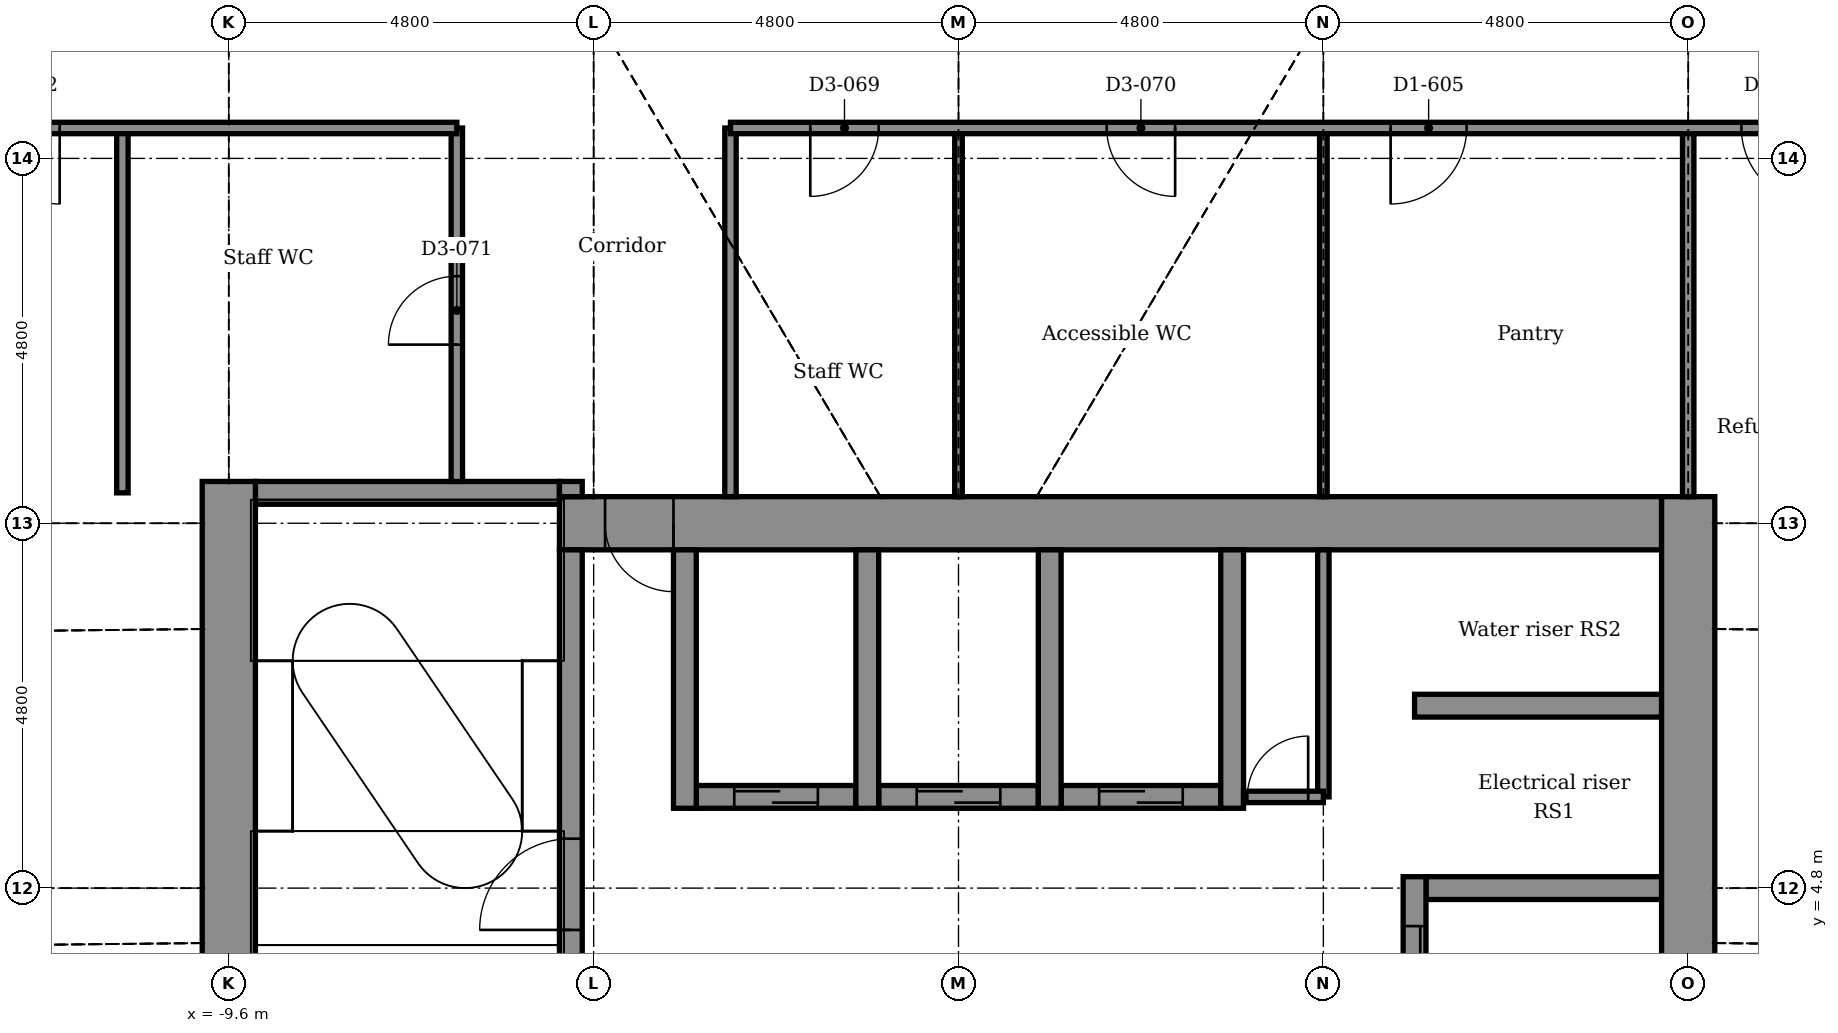
"""IFC4 building model, lengths in metres.
Left out: names, types, materials, properties, quantities, classifications, styles, units other than length and angle.
Written with IfcOpenShell. Run it as: python <this file> out.ifc"""

import sys

from ifc_helpers import new_model, si_unit, direction, frame, frame_2d, origin, place, context, subcontext, project, spatial, rectangle, extrude, element, fill, save


model = new_model("IFC4")
c1 = context("Model", 3, precision=1e-05, world=origin(), true_north=direction((0.0, 1.0)))
c2 = subcontext(c1, "Body", "Model", "MODEL_VIEW")
j1 = project(units=[si_unit("LENGTHUNIT", "METRE"), si_unit("PLANEANGLEUNIT", "RADIAN")], contexts=[c1])
p1 = place(None, origin())
s1 = spatial("IfcSite", under=j1, at=p1, CompositionType="ELEMENT")
p2 = place(p1, origin())
s2 = spatial("IfcBuilding", under=s1, at=p2, CompositionType="ELEMENT")
p3 = place(p2, frame((0.0, 0.0, 216.8)))
s3 = spatial("IfcBuildingStorey", under=s2, at=p3, CompositionType="ELEMENT", Elevation=216.8)
p4 = place(p3, frame((6.15, 4.8, -0.3), z_axis=(0.0, 0.0, 1.0), x_axis=(1.0, 0.0, 0.0)))
e1 = element("IfcWall", 1, at=p4, inside=s3, PredefinedType="STANDARD", context=c2, shape_type="SweptSolid", body=[
    extrude(rectangle(XDim=3.1, YDim=0.3, at=frame_2d((1.55, 0.0))), origin(), (0.0, 0.0, 1.0), 6.15),
])
p5 = place(p3, frame((-3.45, 6.0, -0.3), z_axis=(0.0, 0.0, 1.0), x_axis=(1.0, 0.0, 0.0)))
e2 = element("IfcWall", 2, at=p5, inside=s3, PredefinedType="STANDARD", context=c2, shape_type="SweptSolid", body=[
    extrude(rectangle(XDim=2.1, YDim=0.3, at=frame_2d((1.05, 0.0))), origin(), (0.0, 0.0, 1.0), 6.15),
])
p6 = place(p5, frame((0.5, 0.0, 0.3)))
e3 = element("IfcOpeningElement", 3, at=p6, cuts=e2, PredefinedType="OPENING", context=c2, shape_type="SweptSolid", body=[
    extrude(rectangle(XDim=1.1, YDim=2.1, at=frame_2d((0.55, 1.05))), frame((0.0, 0.16, 0.0), z_axis=(0.0, -1.0, 0.0), x_axis=(1.0, 0.0, 0.0)), (0.0, 0.0, 1.0), 0.32),
])
p7 = place(p3, frame((-1.05, 6.0, -0.3), z_axis=(0.0, 0.0, 1.0), x_axis=(1.0, 0.0, 0.0)))
e4 = element("IfcWall", 4, at=p7, inside=s3, PredefinedType="STANDARD", context=c2, shape_type="SweptSolid", body=[
    extrude(rectangle(XDim=2.1, YDim=0.3, at=frame_2d((1.05, 0.0))), origin(), (0.0, 0.0, 1.0), 6.15),
])
p8 = place(p7, frame((0.5, 0.0, 0.3)))
e5 = element("IfcOpeningElement", 5, at=p8, cuts=e4, PredefinedType="OPENING", context=c2, shape_type="SweptSolid", body=[
    extrude(rectangle(XDim=1.1, YDim=2.1, at=frame_2d((0.55, 1.05))), frame((0.0, 0.16, 0.0), z_axis=(0.0, -1.0, 0.0), x_axis=(1.0, 0.0, 0.0)), (0.0, 0.0, 1.0), 0.32),
])
p9 = place(p3, frame((1.35, 6.0, -0.3), z_axis=(0.0, 0.0, 1.0), x_axis=(1.0, 0.0, 0.0)))
e6 = element("IfcWall", 6, at=p9, inside=s3, PredefinedType="STANDARD", context=c2, shape_type="SweptSolid", body=[
    extrude(rectangle(XDim=2.1, YDim=0.3, at=frame_2d((1.05, 0.0))), origin(), (0.0, 0.0, 1.0), 6.15),
])
p10 = place(p9, frame((0.5, 0.0, 0.3)))
e7 = element("IfcOpeningElement", 7, at=p10, cuts=e6, PredefinedType="OPENING", context=c2, shape_type="SweptSolid", body=[
    extrude(rectangle(XDim=1.1, YDim=2.1, at=frame_2d((0.55, 1.05))), frame((0.0, 0.16, 0.0), z_axis=(0.0, -1.0, 0.0), x_axis=(1.0, 0.0, 0.0)), (0.0, 0.0, 1.0), 0.32),
])
p11 = place(p3, frame((6.0, 7.2, -0.3), z_axis=(0.0, 0.0, 1.0), x_axis=(1.0, 0.0, 0.0)))
e8 = element("IfcWall", 8, at=p11, inside=s3, PredefinedType="STANDARD", context=c2, shape_type="SweptSolid", body=[
    extrude(rectangle(XDim=3.25, YDim=0.3, at=frame_2d((1.625, 0.0))), origin(), (0.0, 0.0, 1.0), 6.15),
])
p12 = place(p3, frame((-5.25, 9.6, -0.3), z_axis=(0.0, 0.0, 1.0), x_axis=(1.0, 0.0, 0.0)))
e9 = element("IfcWall", 9, at=p12, inside=s3, PredefinedType="SHEAR", context=c2, shape_type="SweptSolid", body=[
    extrude(rectangle(XDim=14.5, YDim=0.7, at=frame_2d((7.25, 0.0))), origin(), (0.0, 0.0, 1.0), 6.15),
])
p13 = place(p12, frame((0.6, 0.0, 0.3)))
e10 = element("IfcOpeningElement", 10, at=p13, cuts=e9, PredefinedType="OPENING", context=c2, shape_type="SweptSolid", body=[
    extrude(rectangle(XDim=0.9, YDim=2.1, at=frame_2d((0.45, 1.05))), frame((0.0, 0.36, 0.0), z_axis=(0.0, -1.0, 0.0), x_axis=(1.0, 0.0, 0.0)), (0.0, 0.0, 1.0), 0.72),
])
p14 = place(p3, frame((-9.25, 10.0, -0.3), z_axis=(0.0, 0.0, 1.0), x_axis=(1.0, 0.0, 0.0)))
e11 = element("IfcWall", 11, at=p14, inside=s3, PredefinedType="STANDARD", context=c2, shape_type="SweptSolid", body=[
    extrude(rectangle(XDim=4.0, YDim=0.3, at=frame_2d((2.0, 0.0))), origin(), (0.0, 0.0, 1.0), 6.15),
])
p15 = place(p3, frame((-9.6, 2.55, -0.3), z_axis=(0.0, 0.0, 1.0), x_axis=(0.0, 1.0, 0.0)))
e12 = element("IfcWall", 12, at=p15, inside=s3, PredefinedType="SHEAR", context=c2, shape_type="SweptSolid", body=[
    extrude(rectangle(XDim=7.6, YDim=0.7, at=frame_2d((3.8, 0.0))), origin(), (0.0, 0.0, 1.0), 6.15),
])
p16 = place(p3, frame((-5.1, 2.25, -0.3), z_axis=(0.0, 0.0, 1.0), x_axis=(0.0, 1.0, 0.0)))
e13 = element("IfcWall", 13, at=p16, inside=s3, PredefinedType="STANDARD", context=c2, shape_type="SweptSolid", body=[
    extrude(rectangle(XDim=7.0, YDim=0.3, at=frame_2d((3.5, 0.0))), origin(), (0.0, 0.0, 1.0), 6.15),
])
p17 = place(p16, frame((2.0, 0.0, 0.3)))
e14 = element("IfcOpeningElement", 14, at=p17, cuts=e13, PredefinedType="OPENING", context=c2, shape_type="SweptSolid", body=[
    extrude(rectangle(XDim=1.2, YDim=2.1, at=frame_2d((0.6, 1.05))), frame((0.0, 0.16, 0.0), z_axis=(0.0, -1.0, 0.0), x_axis=(1.0, 0.0, 0.0)), (0.0, 0.0, 1.0), 0.32),
])
p18 = place(p3, frame((-5.1, 9.95, -0.3), z_axis=(0.0, 0.0, 1.0), x_axis=(0.0, 1.0, 0.0)))
e15 = element("IfcWall", 15, at=p18, inside=s3, PredefinedType="STANDARD", context=c2, shape_type="SweptSolid", body=[
    extrude(rectangle(XDim=0.2, YDim=0.3, at=frame_2d((0.1, 0.0))), origin(), (0.0, 0.0, 1.0), 6.15),
])
for number, where, z_axis, x_axis in (
    (16, (-3.6, 5.85, -0.3), (0.0, 0.0, 1.0), (0.0, 1.0, 0.0)),
    (17, (-1.2, 5.85, -0.3), (0.0, 0.0, 1.0), (0.0, 1.0, 0.0)),
    (18, (1.2, 5.85, -0.3), (0.0, 0.0, 1.0), (0.0, 1.0, 0.0)),
    (19, (3.6, 5.85, -0.3), (0.0, 0.0, 1.0), (0.0, 1.0, 0.0)),
):
    element("IfcWall", number, at=place(p3, frame(where, z_axis=z_axis, x_axis=x_axis)), inside=s3, PredefinedType="STANDARD", context=c2, shape_type="SweptSolid", body=[
        extrude(rectangle(XDim=3.4, YDim=0.3, at=frame_2d((1.7, 0.0))), origin(), (0.0, 0.0, 1.0), 6.15),
    ])
p19 = place(p3, frame((6.0, -2.55, -0.3), z_axis=(0.0, 0.0, 1.0), x_axis=(0.0, 1.0, 0.0)))
e20 = element("IfcWall", 20, at=p19, inside=s3, PredefinedType="STANDARD", context=c2, shape_type="SweptSolid", body=[
    extrude(rectangle(XDim=7.5, YDim=0.3, at=frame_2d((3.75, 0.0))), origin(), (0.0, 0.0, 1.0), 6.15),
])
p20 = place(p19, frame((0.65, 0.0, 0.3)))
e21 = element("IfcOpeningElement", 21, at=p20, cuts=e20, PredefinedType="OPENING", context=c2, shape_type="SweptSolid", body=[
    extrude(rectangle(XDim=1.4, YDim=2.1, at=frame_2d((0.7, 1.05))), frame((0.0, 0.16, 0.0), z_axis=(0.0, -1.0, 0.0), x_axis=(1.0, 0.0, 0.0)), (0.0, 0.0, 1.0), 0.32),
])
p21 = place(p19, frame((3.05, 0.0, 0.3)))
e22 = element("IfcOpeningElement", 22, at=p21, cuts=e20, PredefinedType="OPENING", context=c2, shape_type="SweptSolid", body=[
    extrude(rectangle(XDim=1.4, YDim=2.1, at=frame_2d((0.7, 1.05))), frame((0.0, 0.16, 0.0), z_axis=(0.0, -1.0, 0.0), x_axis=(1.0, 0.0, 0.0)), (0.0, 0.0, 1.0), 0.32),
])
p22 = place(p19, frame((5.45, 0.0, 0.3)))
e23 = element("IfcOpeningElement", 23, at=p22, cuts=e20, PredefinedType="OPENING", context=c2, shape_type="SweptSolid", body=[
    extrude(rectangle(XDim=1.4, YDim=2.1, at=frame_2d((0.7, 1.05))), frame((0.0, 0.16, 0.0), z_axis=(0.0, -1.0, 0.0), x_axis=(1.0, 0.0, 0.0)), (0.0, 0.0, 1.0), 0.32),
])
p23 = place(p3, frame((9.6, -10.15, -0.3), z_axis=(0.0, 0.0, 1.0), x_axis=(0.0, 1.0, 0.0)))
e24 = element("IfcWall", 24, at=p23, inside=s3, PredefinedType="SHEAR", context=c2, shape_type="SweptSolid", body=[
    extrude(rectangle(XDim=20.1, YDim=0.7, at=frame_2d((10.05, 0.0))), origin(), (0.0, 0.0, 1.0), 6.15),
])
p24 = place(p3, frame((9.6, 9.95, 0.0), z_axis=(0.0, 0.0, 1.0), x_axis=(0.0, 1.0, 0.0)))
e25 = element("IfcWall", 25, at=p24, inside=s3, PredefinedType="PARTITIONING", context=c2, shape_type="SweptSolid", body=[
    extrude(rectangle(XDim=4.85, YDim=0.15, at=frame_2d((2.425, 0.0))), origin(), (0.0, 0.0, 1.0), 5.393),
])
p25 = place(p3, frame((4.8, 9.95, 0.0), z_axis=(0.0, 0.0, 1.0), x_axis=(0.0, 1.0, 0.0)))
e26 = element("IfcWall", 26, at=p25, inside=s3, PredefinedType="PARTITIONING", context=c2, shape_type="SweptSolid", body=[
    extrude(rectangle(XDim=4.85, YDim=0.1, at=frame_2d((2.425, 0.0))), origin(), (0.0, 0.0, 1.0), 5.54),
])
p26 = place(p3, frame((4.8, 6.0, 0.0), z_axis=(0.0, 0.0, 1.0), x_axis=(0.0, 1.0, 0.0)))
e27 = element("IfcWall", 27, at=p26, inside=s3, PredefinedType="PARTITIONING", context=c2, shape_type="SweptSolid", body=[
    extrude(rectangle(XDim=3.25, YDim=0.15, at=frame_2d((1.625, 0.0))), origin(), (0.0, 0.0, 1.0), 5.85),
])
p27 = place(p3, frame((0.0, 9.95, 0.0), z_axis=(0.0, 0.0, 1.0), x_axis=(0.0, 1.0, 0.0)))
e28 = element("IfcWall", 28, at=p27, inside=s3, PredefinedType="PARTITIONING", context=c2, shape_type="SweptSolid", body=[
    extrude(rectangle(XDim=4.85, YDim=0.1, at=frame_2d((2.425, 0.0))), origin(), (0.0, 0.0, 1.0), 5.317),
])
p28 = place(p3, frame((-3.0, 9.95, 0.0), z_axis=(0.0, 0.0, 1.0), x_axis=(0.0, 1.0, 0.0)))
e29 = element("IfcWall", 29, at=p28, inside=s3, PredefinedType="PARTITIONING", context=c2, shape_type="SweptSolid", body=[
    extrude(rectangle(XDim=4.85, YDim=0.15, at=frame_2d((2.425, 0.0))), origin(), (0.0, 0.0, 1.0), 5.85),
])
p29 = place(p3, frame((-6.6, 10.15, 0.0), z_axis=(0.0, 0.0, 1.0), x_axis=(0.0, 1.0, 0.0)))
e30 = element("IfcWall", 30, at=p29, inside=s3, PredefinedType="PARTITIONING", context=c2, shape_type="SweptSolid", body=[
    extrude(rectangle(XDim=4.65, YDim=0.15, at=frame_2d((2.325, 0.0))), origin(), (0.0, 0.0, 1.0), 5.85),
])
p30 = place(p29, frame((1.8, 0.0, 0.0)))
e31 = element("IfcOpeningElement", 31, at=p30, cuts=e30, PredefinedType="OPENING", context=c2, shape_type="SweptSolid", body=[
    extrude(rectangle(XDim=0.9, YDim=2.1, at=frame_2d((0.45, 1.05))), frame((0.0, 0.085, 0.0), z_axis=(0.0, -1.0, 0.0), x_axis=(1.0, 0.0, 0.0)), (0.0, 0.0, 1.0), 0.17),
])
p31 = place(p3, frame((-11.0, 10.0, 0.0), z_axis=(0.0, 0.0, 1.0), x_axis=(0.0, 1.0, 0.0)))
e32 = element("IfcWall", 32, at=p31, inside=s3, PredefinedType="PARTITIONING", context=c2, shape_type="SweptSolid", body=[
    extrude(rectangle(XDim=4.8, YDim=0.15, at=frame_2d((2.4, 0.0))), origin(), (0.0, 0.0, 1.0), 5.85),
])
p32 = place(p3, frame((3.75, 6.0, 0.0), z_axis=(0.0, 0.0, 1.0), x_axis=(1.0, 0.0, 0.0)))
e33 = element("IfcWall", 33, at=p32, inside=s3, PredefinedType="PARTITIONING", context=c2, shape_type="SweptSolid", body=[
    extrude(rectangle(XDim=1.05, YDim=0.15, at=frame_2d((0.525, 0.0))), origin(), (0.0, 0.0, 1.0), 5.85),
])
p33 = place(p32, frame((0.05, 0.0, 0.0)))
e34 = element("IfcOpeningElement", 34, at=p33, cuts=e33, PredefinedType="OPENING", context=c2, shape_type="SweptSolid", body=[
    extrude(rectangle(XDim=0.8, YDim=2.1, at=frame_2d((0.4, 1.05))), frame((0.0, 0.085, 0.0), z_axis=(0.0, -1.0, 0.0), x_axis=(1.0, 0.0, 0.0)), (0.0, 0.0, 1.0), 0.17),
])
p34 = place(p3, frame((-18.385, 14.8, 0.0), z_axis=(0.0, 0.0, 1.0), x_axis=(1.0, 0.0, 0.0)))
e35 = element("IfcWall", 35, at=p34, inside=s3, PredefinedType="PARTITIONING", context=c2, shape_type="SweptSolid", body=[
    extrude(rectangle(XDim=11.784, YDim=0.15, at=frame_2d((5.892, 0.0))), origin(), (0.0, 0.0, 1.0), 5.85),
])
p35 = place(p34, frame((5.56, 0.0, 0.0)))
e36 = element("IfcOpeningElement", 36, at=p35, cuts=e35, PredefinedType="OPENING", context=c2, shape_type="SweptSolid", body=[
    extrude(rectangle(XDim=1.0, YDim=2.1, at=frame_2d((0.5, 1.05))), frame((0.0, 0.085, 0.0), z_axis=(0.0, -1.0, 0.0), x_axis=(1.0, 0.0, 0.0)), (0.0, 0.0, 1.0), 0.17),
])
p36 = place(p3, frame((-3.0, 14.8, 0.0), z_axis=(0.0, 0.0, 1.0), x_axis=(1.0, 0.0, 0.0)))
e37 = element("IfcWall", 37, at=p36, inside=s3, PredefinedType="PARTITIONING", context=c2, shape_type="SweptSolid", body=[
    extrude(rectangle(XDim=21.385, YDim=0.15, at=frame_2d((10.692, 0.0))), origin(), (0.0, 0.0, 1.0), 5.85),
])
p37 = place(p36, frame((1.05, 0.0, 0.0)))
e38 = element("IfcOpeningElement", 38, at=p37, cuts=e37, PredefinedType="OPENING", context=c2, shape_type="SweptSolid", body=[
    extrude(rectangle(XDim=0.9, YDim=2.1, at=frame_2d((0.45, 1.05))), frame((0.0, 0.085, 0.0), z_axis=(0.0, -1.0, 0.0), x_axis=(1.0, 0.0, 0.0)), (0.0, 0.0, 1.0), 0.17),
])
p38 = place(p36, frame((4.95, 0.0, 0.0)))
e39 = element("IfcOpeningElement", 39, at=p38, cuts=e37, PredefinedType="OPENING", context=c2, shape_type="SweptSolid", body=[
    extrude(rectangle(XDim=0.9, YDim=2.1, at=frame_2d((0.45, 1.05))), frame((0.0, 0.085, 0.0), z_axis=(0.0, -1.0, 0.0), x_axis=(1.0, 0.0, 0.0)), (0.0, 0.0, 1.0), 0.17),
])
p39 = place(p36, frame((8.685, 0.0, 0.0)))
e40 = element("IfcOpeningElement", 40, at=p39, cuts=e37, PredefinedType="OPENING", context=c2, shape_type="SweptSolid", body=[
    extrude(rectangle(XDim=1.0, YDim=2.1, at=frame_2d((0.5, 1.05))), frame((0.0, 0.085, 0.0), z_axis=(0.0, -1.0, 0.0), x_axis=(1.0, 0.0, 0.0)), (0.0, 0.0, 1.0), 0.17),
])
p40 = place(p36, frame((13.3, 0.0, 0.0)))
e41 = element("IfcOpeningElement", 41, at=p40, cuts=e37, PredefinedType="OPENING", context=c2, shape_type="SweptSolid", body=[
    extrude(rectangle(XDim=1.0, YDim=2.1, at=frame_2d((0.5, 1.05))), frame((0.0, 0.085, 0.0), z_axis=(0.0, -1.0, 0.0), x_axis=(1.0, 0.0, 0.0)), (0.0, 0.0, 1.0), 0.17),
])
p41 = place(p36, frame((15.5, 0.0, 0.0)))
e42 = element("IfcOpeningElement", 42, at=p41, cuts=e37, PredefinedType="OPENING", context=c2, shape_type="SweptSolid", body=[
    extrude(rectangle(XDim=1.0, YDim=2.1, at=frame_2d((0.5, 1.05))), frame((0.0, 0.085, 0.0), z_axis=(0.0, -1.0, 0.0), x_axis=(1.0, 0.0, 0.0)), (0.0, 0.0, 1.0), 0.17),
])
p42 = place(p33, origin())
e43 = element("IfcDoor", 43, at=p42, inside=s3, OperationType="SINGLE_SWING_RIGHT", PredefinedType="DOOR", context=c2, shape_type="SweptSolid", body=[
    extrude(rectangle(XDim=0.8, YDim=2.1, at=frame_2d((0.4, 1.05))), frame((0.0, 0.025, 0.0), z_axis=(0.0, -1.0, 0.0), x_axis=(1.0, 0.0, 0.0)), (0.0, 0.0, 1.0), 0.05),
])
fill(e34, e43)
p43 = place(p37, frame((0.9, 0.0, 0.0), z_axis=(0.0, 0.0, 1.0), x_axis=(-1.0, 0.0, 0.0)))
e44 = element("IfcDoor", 44, at=p43, inside=s3, OperationType="SINGLE_SWING_LEFT", PredefinedType="DOOR", context=c2, shape_type="SweptSolid", body=[
    extrude(rectangle(XDim=0.9, YDim=2.1, at=frame_2d((0.45, 1.05))), frame((0.0, 0.025, 0.0), z_axis=(0.0, -1.0, 0.0), x_axis=(1.0, 0.0, 0.0)), (0.0, 0.0, 1.0), 0.05),
])
fill(e38, e44)
p44 = place(p38, frame((0.9, 0.0, 0.0), z_axis=(0.0, 0.0, 1.0), x_axis=(-1.0, 0.0, 0.0)))
e45 = element("IfcDoor", 45, at=p44, inside=s3, OperationType="SINGLE_SWING_RIGHT", PredefinedType="DOOR", context=c2, shape_type="SweptSolid", body=[
    extrude(rectangle(XDim=0.9, YDim=2.1, at=frame_2d((0.45, 1.05))), frame((0.0, 0.025, 0.0), z_axis=(0.0, -1.0, 0.0), x_axis=(1.0, 0.0, 0.0)), (0.0, 0.0, 1.0), 0.05),
])
fill(e39, e45)
p45 = place(p39, frame((1.0, 0.0, 0.0), z_axis=(0.0, 0.0, 1.0), x_axis=(-1.0, 0.0, 0.0)))
e46 = element("IfcDoor", 46, at=p45, inside=s3, OperationType="SINGLE_SWING_LEFT", PredefinedType="DOOR", context=c2, shape_type="SweptSolid", body=[
    extrude(rectangle(XDim=1.0, YDim=2.1, at=frame_2d((0.5, 1.05))), frame((0.0, 0.025, 0.0), z_axis=(0.0, -1.0, 0.0), x_axis=(1.0, 0.0, 0.0)), (0.0, 0.0, 1.0), 0.05),
])
fill(e40, e46)
p46 = place(p30, origin())
e47 = element("IfcDoor", 47, at=p46, inside=s3, OperationType="SINGLE_SWING_LEFT", PredefinedType="DOOR", context=c2, shape_type="SweptSolid", body=[
    extrude(rectangle(XDim=0.9, YDim=2.1, at=frame_2d((0.45, 1.05))), frame((0.0, 0.025, 0.0), z_axis=(0.0, -1.0, 0.0), x_axis=(1.0, 0.0, 0.0)), (0.0, 0.0, 1.0), 0.05),
])
fill(e31, e47)
p47 = place(p40, frame((1.0, 0.0, 0.0), z_axis=(0.0, 0.0, 1.0), x_axis=(-1.0, 0.0, 0.0)))
e48 = element("IfcDoor", 48, at=p47, inside=s3, OperationType="SINGLE_SWING_RIGHT", PredefinedType="DOOR", context=c2, shape_type="SweptSolid", body=[
    extrude(rectangle(XDim=1.0, YDim=2.1, at=frame_2d((0.5, 1.05))), frame((0.0, 0.025, 0.0), z_axis=(0.0, -1.0, 0.0), x_axis=(1.0, 0.0, 0.0)), (0.0, 0.0, 1.0), 0.05),
])
fill(e41, e48)
p48 = place(p35, frame((1.0, 0.0, 0.0), z_axis=(0.0, 0.0, 1.0), x_axis=(-1.0, 0.0, 0.0)))
e49 = element("IfcDoor", 49, at=p48, inside=s3, OperationType="SINGLE_SWING_RIGHT", PredefinedType="DOOR", context=c2, shape_type="SweptSolid", body=[
    extrude(rectangle(XDim=1.0, YDim=2.1, at=frame_2d((0.5, 1.05))), frame((0.0, 0.025, 0.0), z_axis=(0.0, -1.0, 0.0), x_axis=(1.0, 0.0, 0.0)), (0.0, 0.0, 1.0), 0.05),
])
fill(e36, e49)
p49 = place(p22, origin())
e50 = element("IfcDoor", 50, at=p49, inside=s3, OperationType="DOUBLE_DOOR_SLIDING", PredefinedType="DOOR", context=c2, shape_type="SweptSolid", body=[
    extrude(rectangle(XDim=1.4, YDim=2.1, at=frame_2d((0.7, 1.05))), frame((0.0, 0.025, 0.0), z_axis=(0.0, -1.0, 0.0), x_axis=(1.0, 0.0, 0.0)), (0.0, 0.0, 1.0), 0.05),
])
fill(e23, e50)
p50 = place(p6, origin())
e51 = element("IfcDoor", 51, at=p50, inside=s3, OperationType="DOUBLE_DOOR_SLIDING", PredefinedType="DOOR", context=c2, shape_type="SweptSolid", body=[
    extrude(rectangle(XDim=1.1, YDim=2.1, at=frame_2d((0.55, 1.05))), frame((0.0, 0.025, 0.0), z_axis=(0.0, -1.0, 0.0), x_axis=(1.0, 0.0, 0.0)), (0.0, 0.0, 1.0), 0.05),
])
fill(e3, e51)
p51 = place(p8, origin())
e52 = element("IfcDoor", 52, at=p51, inside=s3, OperationType="DOUBLE_DOOR_SLIDING", PredefinedType="DOOR", context=c2, shape_type="SweptSolid", body=[
    extrude(rectangle(XDim=1.1, YDim=2.1, at=frame_2d((0.55, 1.05))), frame((0.0, 0.025, 0.0), z_axis=(0.0, -1.0, 0.0), x_axis=(1.0, 0.0, 0.0)), (0.0, 0.0, 1.0), 0.05),
])
fill(e5, e52)
p52 = place(p10, origin())
e53 = element("IfcDoor", 53, at=p52, inside=s3, OperationType="DOUBLE_DOOR_SLIDING", PredefinedType="DOOR", context=c2, shape_type="SweptSolid", body=[
    extrude(rectangle(XDim=1.1, YDim=2.1, at=frame_2d((0.55, 1.05))), frame((0.0, 0.025, 0.0), z_axis=(0.0, -1.0, 0.0), x_axis=(1.0, 0.0, 0.0)), (0.0, 0.0, 1.0), 0.05),
])
fill(e7, e53)
p53 = place(p17, origin())
e54 = element("IfcDoor", 54, at=p53, inside=s3, OperationType="SINGLE_SWING_LEFT", PredefinedType="DOOR", context=c2, shape_type="SweptSolid", body=[
    extrude(rectangle(XDim=1.2, YDim=2.1, at=frame_2d((0.6, 1.05))), frame((0.0, 0.025, 0.0), z_axis=(0.0, -1.0, 0.0), x_axis=(1.0, 0.0, 0.0)), (0.0, 0.0, 1.0), 0.05),
])
fill(e14, e54)
p54 = place(p13, frame((0.9, 0.0, 0.0), z_axis=(0.0, 0.0, 1.0), x_axis=(-1.0, 0.0, 0.0)))
e55 = element("IfcDoor", 55, at=p54, inside=s3, OperationType="SINGLE_SWING_RIGHT", PredefinedType="DOOR", context=c2, shape_type="SweptSolid", body=[
    extrude(rectangle(XDim=0.9, YDim=2.1, at=frame_2d((0.45, 1.05))), frame((0.0, 0.025, 0.0), z_axis=(0.0, -1.0, 0.0), x_axis=(1.0, 0.0, 0.0)), (0.0, 0.0, 1.0), 0.05),
])
fill(e10, e55)
save(model, sys.argv[1])
